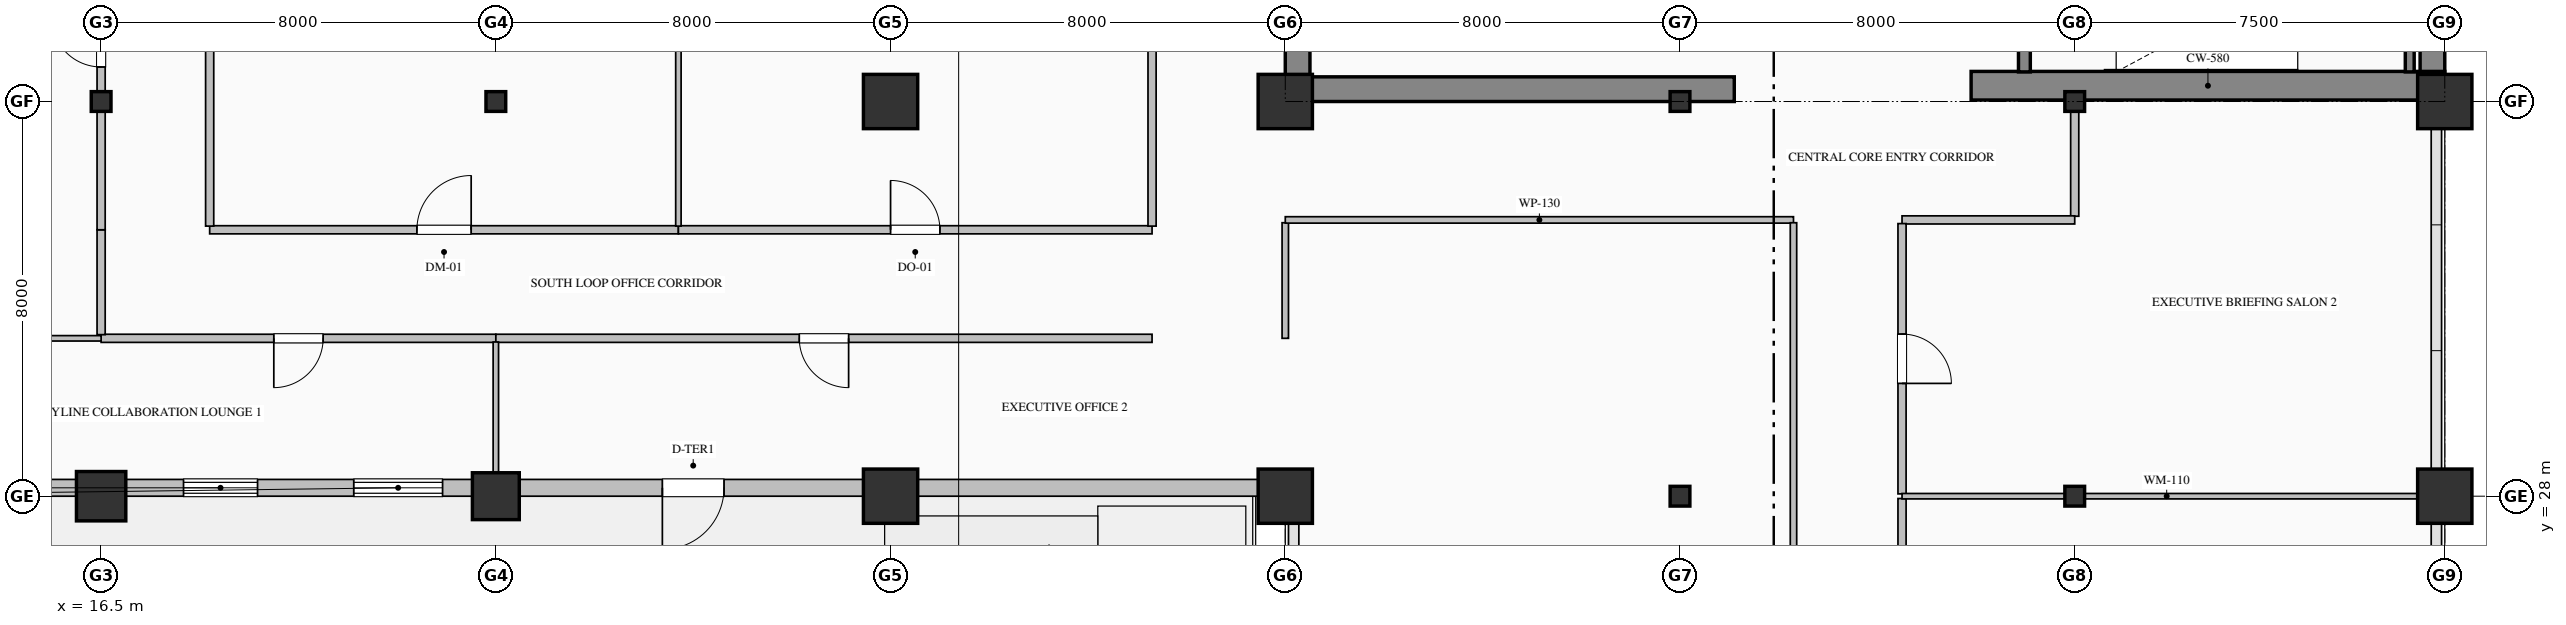
"""IFC4 building model, lengths in metres.
Left out: names, types, materials, properties, quantities, classifications, styles, units other than length and angle.
Written with IfcOpenShell. Run it as: python <this file> out.ifc"""

import sys

from ifc_helpers import new_model, si_unit, direction, frame, frame_2d, origin, origin_2d, place, context, subcontext, project, spatial, rectangle, hollow_rectangle, hollow_circle, i_section, extrude, element, fill, save


model = new_model("IFC4")
c1 = context("Model", 3, precision=1e-05, world=origin(), true_north=direction((0.0, 1.0)))
c2 = subcontext(c1, "Body", "Model", "MODEL_VIEW")
j1 = project(units=[si_unit("LENGTHUNIT", "METRE"), si_unit("PLANEANGLEUNIT", "RADIAN")], contexts=[c1])
p1 = place(None, origin())
s1 = spatial("IfcSite", under=j1, at=p1, CompositionType="ELEMENT")
p2 = place(p1, origin())
s2 = spatial("IfcBuilding", under=s1, at=p2, CompositionType="ELEMENT")
p3 = place(p2, frame((0.0, 0.0, 113.6)))
s3 = spatial("IfcBuildingStorey", under=s2, at=p3, CompositionType="ELEMENT", Elevation=113.6)
p4 = place(p3, frame((63.75, 36.32, 0.0), z_axis=(0.0, 0.0, 1.0), x_axis=(0.0, 1.0, 0.0)))
e1 = element("IfcWall", 1, at=p4, inside=s3, PredefinedType="SHEAR", context=c2, shape_type="SweptSolid", body=[
    extrude(rectangle(XDim=15.18, YDim=0.5, at=frame_2d((7.59, 0.0))), origin(), (0.0, 0.0, 1.0), 5.165),
])
p5 = place(p3, frame((40.75, 36.5, 0.0), z_axis=(0.0, 0.0, 1.0), x_axis=(0.0, 1.0, 0.0)))
e2 = element("IfcWall", 2, at=p5, inside=s3, PredefinedType="SHEAR", context=c2, shape_type="SweptSolid", body=[
    extrude(rectangle(XDim=7.9, YDim=0.5, at=frame_2d((3.95, 0.0))), origin(), (0.0, 0.0, 1.0), 5.165),
])
p6 = place(p3, frame((40.5, 36.25, 0.0), z_axis=(0.0, 0.0, 1.0), x_axis=(1.0, 0.0, 0.0)))
e3 = element("IfcWall", 3, at=p6, inside=s3, PredefinedType="SHEAR", context=c2, shape_type="SweptSolid", body=[
    extrude(rectangle(XDim=9.1, YDim=0.5, at=frame_2d((4.55, 0.0))), origin(), (0.0, 0.0, 1.0), 5.165),
])
p7 = place(p3, frame((54.4, 36.32, 0.0), z_axis=(0.0, 0.0, 1.0), x_axis=(1.0, 0.0, 0.0)))
e4 = element("IfcWall", 4, at=p7, inside=s3, PredefinedType="SHEAR", context=c2, shape_type="SweptSolid", body=[
    extrude(rectangle(XDim=9.6, YDim=0.58, at=frame_2d((4.8, 0.0))), origin(), (0.0, 0.0, 1.0), 5.4),
])
p8 = place(p3, frame((16.5, 28.0, 0.0), z_axis=(0.0, 0.0, 1.0), x_axis=(1.0, 0.0, 0.0)))
e5 = element("IfcColumn", 5, at=p8, inside=s3, PredefinedType="COLUMN", context=c2, shape_type="SweptSolid", body=[
    extrude(hollow_circle(Radius=0.5, WallThickness=0.036, at=origin_2d()), origin(), (0.0, 0.0, 1.0), 5.4),
])
p9 = place(p3, frame((16.5, 36.0, 0.0), z_axis=(0.0, 0.0, 1.0), x_axis=(1.0, 0.0, 0.0)))
e6 = element("IfcColumn", 6, at=p9, inside=s3, PredefinedType="COLUMN", context=c2, shape_type="SweptSolid", body=[
    extrude(i_section(OverallWidth=0.4, OverallDepth=0.4, WebThickness=0.013, FlangeThickness=0.021, FilletRadius=0.022, at=origin_2d()), origin(), (0.0, 0.0, 1.0), 5.4),
])
p10 = place(p3, frame((24.5, 28.0, 0.0), z_axis=(0.0, 0.0, 1.0), x_axis=(1.0, 0.0, 0.0)))
e7 = element("IfcColumn", 7, at=p10, inside=s3, PredefinedType="COLUMN", context=c2, shape_type="SweptSolid", body=[
    extrude(hollow_rectangle(XDim=0.95, YDim=0.95, WallThickness=0.036, at=origin_2d()), origin(), (0.0, 0.0, 1.0), 5.4),
])
p11 = place(p3, frame((24.5, 36.0, 0.0), z_axis=(0.0, 0.0, 1.0), x_axis=(1.0, 0.0, 0.0)))
e8 = element("IfcColumn", 8, at=p11, inside=s3, PredefinedType="COLUMN", context=c2, shape_type="SweptSolid", body=[
    extrude(i_section(OverallWidth=0.4, OverallDepth=0.4, WebThickness=0.013, FlangeThickness=0.021, FilletRadius=0.022, at=origin_2d()), origin(), (0.0, 0.0, 1.0), 5.4),
])
for number, where, z_axis, x_axis in (
    (9, (32.5, 28.0, 0.0), (0.0, 0.0, 1.0), (1.0, 0.0, 0.0)),
    (10, (32.5, 36.0, 0.0), (0.0, 0.0, 1.0), (1.0, 0.0, 0.0)),
    (11, (40.5, 28.0, 0.0), (0.0, 0.0, 1.0), (1.0, 0.0, 0.0)),
    (12, (40.5, 36.0, 0.0), (0.0, 0.0, 1.0), (1.0, 0.0, 0.0)),
):
    element("IfcColumn", number, at=place(p3, frame(where, z_axis=z_axis, x_axis=x_axis)), inside=s3, PredefinedType="COLUMN", context=c2, shape_type="SweptSolid", body=[
        extrude(hollow_rectangle(XDim=1.1, YDim=1.1, WallThickness=0.04, at=origin_2d()), origin(), (0.0, 0.0, 1.0), 5.4),
    ])
for number, where, z_axis, x_axis in (
    (13, (48.5, 28.0, 0.0), (0.0, 0.0, 1.0), (1.0, 0.0, 0.0)),
    (14, (48.5, 36.0, 0.0), (0.0, 0.0, 1.0), (1.0, 0.0, 0.0)),
    (15, (56.5, 28.0, 0.0), (0.0, 0.0, 1.0), (1.0, 0.0, 0.0)),
    (16, (56.5, 36.0, 0.0), (0.0, 0.0, 1.0), (1.0, 0.0, 0.0)),
):
    element("IfcColumn", number, at=place(p3, frame(where, z_axis=z_axis, x_axis=x_axis)), inside=s3, PredefinedType="COLUMN", context=c2, shape_type="SweptSolid", body=[
        extrude(i_section(OverallWidth=0.4, OverallDepth=0.4, WebThickness=0.013, FlangeThickness=0.021, FilletRadius=0.022, at=origin_2d()), origin(), (0.0, 0.0, 1.0), 5.4),
    ])
for number, where, z_axis, x_axis in (
    (17, (64.0, 28.0, 0.0), (0.0, 0.0, 1.0), (1.0, 0.0, 0.0)),
    (18, (64.0, 36.0, 0.0), (0.0, 0.0, 1.0), (1.0, 0.0, 0.0)),
):
    element("IfcColumn", number, at=place(p3, frame(where, z_axis=z_axis, x_axis=x_axis)), inside=s3, PredefinedType="COLUMN", context=c2, shape_type="SweptSolid", body=[
        extrude(hollow_rectangle(XDim=1.1, YDim=1.1, WallThickness=0.04, at=origin_2d()), origin(), (0.0, 0.0, 1.0), 5.4),
    ])
p12 = place(p3, frame((40.52, 28.17, 0.0), z_axis=(0.0, 0.0, 1.0), x_axis=(-1.0, 0.0, 0.0)))
e19 = element("IfcWall", 19, at=p12, inside=s3, PredefinedType="SOLIDWALL", context=c2, shape_type="SweptSolid", body=[
    extrude(rectangle(XDim=27.52, YDim=0.34, at=frame_2d((13.76, 0.0))), origin(), (0.0, 0.0, 1.0), 4.565),
])
p13 = place(p12, frame((17.1, 0.0, 0.65)))
e20 = element("IfcOpeningElement", 20, at=p13, cuts=e19, PredefinedType="OPENING", context=c2, shape_type="SweptSolid", body=[
    extrude(rectangle(XDim=1.8, YDim=2.55, at=frame_2d((0.9, 1.275))), frame((0.0, 0.18, 0.0), z_axis=(0.0, -1.0, 0.0), x_axis=(1.0, 0.0, 0.0)), (0.0, 0.0, 1.0), 0.36),
])
p14 = place(p12, frame((20.85, 0.0, 0.85)))
e21 = element("IfcOpeningElement", 21, at=p14, cuts=e19, PredefinedType="OPENING", context=c2, shape_type="SweptSolid", body=[
    extrude(rectangle(XDim=1.5, YDim=1.95, at=frame_2d((0.75, 0.975))), frame((0.0, 0.18, 0.0), z_axis=(0.0, -1.0, 0.0), x_axis=(1.0, 0.0, 0.0)), (0.0, 0.0, 1.0), 0.36),
])
p15 = place(p12, frame((11.395, 0.0, 0.0)))
e22 = element("IfcOpeningElement", 22, at=p15, cuts=e19, PredefinedType="OPENING", context=c2, shape_type="SweptSolid", body=[
    extrude(rectangle(XDim=1.25, YDim=2.25, at=frame_2d((0.625, 1.125))), frame((0.0, 0.18, 0.0), z_axis=(0.0, -1.0, 0.0), x_axis=(1.0, 0.0, 0.0)), (0.0, 0.0, 1.0), 0.36),
])
p16 = place(p3, frame((55.48, 39.75, 0.0), z_axis=(0.0, 0.0, 1.0), x_axis=(0.0, -1.0, 0.0)))
e23 = element("IfcWall", 23, at=p16, inside=s3, PredefinedType="SOLIDWALL", context=c2, shape_type="SweptSolid", body=[
    extrude(rectangle(XDim=3.15, YDim=0.24, at=frame_2d((1.575, 0.0))), origin(), (0.0, 0.0, 1.0), 5.4),
])
p17 = place(p16, frame((1.0, 0.0, 0.0)))
e24 = element("IfcOpeningElement", 24, at=p17, cuts=e23, PredefinedType="OPENING", context=c2, shape_type="SweptSolid", body=[
    extrude(rectangle(XDim=1.15, YDim=2.2, at=frame_2d((0.575, 1.1))), frame((0.0, 0.13, 0.0), z_axis=(0.0, -1.0, 0.0), x_axis=(1.0, 0.0, 0.0)), (0.0, 0.0, 1.0), 0.26),
])
p18 = place(p3, frame((63.29, 36.6, 0.0), z_axis=(0.0, 0.0, 1.0), x_axis=(0.0, 1.0, 0.0)))
e25 = element("IfcWall", 25, at=p18, inside=s3, PredefinedType="SOLIDWALL", context=c2, shape_type="SweptSolid", body=[
    extrude(rectangle(XDim=3.15, YDim=0.18, at=frame_2d((1.575, 0.0))), origin(), (0.0, 0.0, 1.0), 5.4),
])
p19 = place(p3, frame((18.7, 33.4, 0.0), z_axis=(0.0, 0.0, 1.0), x_axis=(1.0, 0.0, 0.0)))
e26 = element("IfcWall", 26, at=p19, inside=s3, PredefinedType="PARTITIONING", context=c2, shape_type="SweptSolid", body=[
    extrude(rectangle(XDim=9.5, YDim=0.165, at=frame_2d((4.75, 0.0))), origin(), (0.0, 0.0, 1.0), 5.165),
])
p20 = place(p19, frame((4.2, 0.0, 0.0)))
e27 = element("IfcOpeningElement", 27, at=p20, cuts=e26, PredefinedType="OPENING", context=c2, shape_type="SweptSolid", body=[
    extrude(rectangle(XDim=1.1, YDim=2.2, at=frame_2d((0.55, 1.1))), frame((0.0, 0.093, 0.0), z_axis=(0.0, -1.0, 0.0), x_axis=(1.0, 0.0, 0.0)), (0.0, 0.0, 1.0), 0.185),
])
p21 = place(p3, frame((28.2, 33.4, 0.0), z_axis=(0.0, 0.0, 1.0), x_axis=(1.0, 0.0, 0.0)))
e28 = element("IfcWall", 28, at=p21, inside=s3, PredefinedType="PARTITIONING", context=c2, shape_type="SweptSolid", body=[
    extrude(rectangle(XDim=9.6, YDim=0.165, at=frame_2d((4.8, 0.0))), origin(), (0.0, 0.0, 1.0), 5.165),
])
p22 = place(p21, frame((4.3, 0.0, 0.0)))
e29 = element("IfcOpeningElement", 29, at=p22, cuts=e28, PredefinedType="OPENING", context=c2, shape_type="SweptSolid", body=[
    extrude(rectangle(XDim=1.0, YDim=2.15, at=frame_2d((0.5, 1.075))), frame((0.0, 0.093, 0.0), z_axis=(0.0, -1.0, 0.0), x_axis=(1.0, 0.0, 0.0)), (0.0, 0.0, 1.0), 0.185),
])
p23 = place(p3, frame((24.5, 31.2, 0.0), z_axis=(0.0, 0.0, 1.0), x_axis=(-1.0, 0.0, 0.0)))
e30 = element("IfcWall", 30, at=p23, inside=s3, PredefinedType="PARTITIONING", context=c2, shape_type="SweptSolid", body=[
    extrude(rectangle(XDim=8.0, YDim=0.165, at=frame_2d((4.0, 0.0))), origin(), (0.0, 0.0, 1.0), 5.165),
])
p24 = place(p23, frame((3.5, 0.0, 0.0)))
e31 = element("IfcOpeningElement", 31, at=p24, cuts=e30, PredefinedType="OPENING", context=c2, shape_type="SweptSolid", body=[
    extrude(rectangle(XDim=1.0, YDim=2.15, at=frame_2d((0.5, 1.075))), frame((0.0, 0.093, 0.0), z_axis=(0.0, -1.0, 0.0), x_axis=(1.0, 0.0, 0.0)), (0.0, 0.0, 1.0), 0.185),
])
p25 = place(p3, frame((37.8, 31.2, 0.0), z_axis=(0.0, 0.0, 1.0), x_axis=(-1.0, 0.0, 0.0)))
e32 = element("IfcWall", 32, at=p25, inside=s3, PredefinedType="PARTITIONING", context=c2, shape_type="SweptSolid", body=[
    extrude(rectangle(XDim=13.3, YDim=0.165, at=frame_2d((6.65, 0.0))), origin(), (0.0, 0.0, 1.0), 5.165),
])
p26 = place(p25, frame((6.15, 0.0, 0.0)))
e33 = element("IfcOpeningElement", 33, at=p26, cuts=e32, PredefinedType="OPENING", context=c2, shape_type="SweptSolid", body=[
    extrude(rectangle(XDim=1.0, YDim=2.15, at=frame_2d((0.5, 1.075))), frame((0.0, 0.093, 0.0), z_axis=(0.0, -1.0, 0.0), x_axis=(1.0, 0.0, 0.0)), (0.0, 0.0, 1.0), 0.185),
])
p27 = place(p3, frame((16.5, 31.274, 0.0), z_axis=(0.0, 0.0, 1.0), x_axis=(0.0, 1.0, 0.0)))
e34 = element("IfcWall", 34, at=p27, inside=s3, PredefinedType="PARTITIONING", context=c2, shape_type="SweptSolid", body=[
    extrude(rectangle(XDim=2.125, YDim=0.165, at=frame_2d((1.063, 0.0))), origin(), (0.0, 0.0, 1.0), 4.557),
])
p28 = place(p3, frame((18.7, 40.926, 0.0), z_axis=(0.0, 0.0, 1.0), x_axis=(0.0, -1.0, 0.0)))
e35 = element("IfcWall", 35, at=p28, inside=s3, PredefinedType="PARTITIONING", context=c2, shape_type="SweptSolid", body=[
    extrude(rectangle(XDim=7.451, YDim=0.165, at=frame_2d((3.726, 0.0))), origin(), (0.0, 0.0, 1.0), 5.165),
])
p29 = place(p3, frame((16.5, 33.4, 0.0), z_axis=(0.0, 0.0, 1.0), x_axis=(0.0, 1.0, 0.0)))
e36 = element("IfcWall", 36, at=p29, inside=s3, PredefinedType="PARTITIONING", context=c2, shape_type="SweptSolid", body=[
    extrude(rectangle(XDim=7.6, YDim=0.165, at=frame_2d((3.8, 0.0))), origin(), (0.0, 0.0, 1.0), 4.557),
])
p30 = place(p29, frame((3.3, 0.0, 0.0)))
e37 = element("IfcOpeningElement", 37, at=p30, cuts=e36, PredefinedType="OPENING", context=c2, shape_type="SweptSolid", body=[
    extrude(rectangle(XDim=1.0, YDim=2.15, at=frame_2d((0.5, 1.075))), frame((0.0, 0.093, 0.0), z_axis=(0.0, -1.0, 0.0), x_axis=(1.0, 0.0, 0.0)), (0.0, 0.0, 1.0), 0.185),
])
p31 = place(p3, frame((37.8, 33.475, 0.0), z_axis=(0.0, 0.0, 1.0), x_axis=(0.0, 1.0, 0.0)))
e38 = element("IfcWall", 38, at=p31, inside=s3, PredefinedType="PARTITIONING", context=c2, shape_type="SweptSolid", body=[
    extrude(rectangle(XDim=7.451, YDim=0.165, at=frame_2d((3.726, 0.0))), origin(), (0.0, 0.0, 1.0), 5.165),
])
p32 = place(p3, frame((40.5, 33.543, 0.0), z_axis=(0.0, 0.0, 1.0), x_axis=(0.0, -1.0, 0.0)))
e39 = element("IfcWall", 39, at=p32, inside=s3, PredefinedType="PARTITIONING", context=c2, shape_type="SweptSolid", body=[
    extrude(rectangle(XDim=2.343, YDim=0.13, at=frame_2d((1.171, 0.0))), origin(), (0.0, 0.0, 1.0), 4.557),
])
p33 = place(p3, frame((56.5, 36.0, 0.0), z_axis=(0.0, 0.0, 1.0), x_axis=(0.0, -1.0, 0.0)))
e40 = element("IfcWall", 40, at=p33, inside=s3, PredefinedType="PARTITIONING", context=c2, shape_type="SweptSolid", body=[
    extrude(rectangle(XDim=2.325, YDim=0.165, at=frame_2d((1.163, 0.0))), origin(), (0.0, 0.0, 1.0), 4.557),
])
p34 = place(p3, frame((56.5, 33.6, 0.0), z_axis=(0.0, 0.0, 1.0), x_axis=(-1.0, 0.0, 0.0)))
e41 = element("IfcWall", 41, at=p34, inside=s3, PredefinedType="PARTITIONING", context=c2, shape_type="SweptSolid", body=[
    extrude(rectangle(XDim=3.5, YDim=0.165, at=frame_2d((1.75, 0.0))), origin(), (0.0, 0.0, 1.0), 5.165),
])
p35 = place(p3, frame((50.8, 33.6, 0.0), z_axis=(0.0, 0.0, 1.0), x_axis=(-1.0, 0.0, 0.0)))
e42 = element("IfcWall", 42, at=p35, inside=s3, PredefinedType="PARTITIONING", context=c2, shape_type="SweptSolid", body=[
    extrude(rectangle(XDim=10.3, YDim=0.13, at=frame_2d((5.15, 0.0))), origin(), (0.0, 0.0, 1.0), 5.165),
])
p36 = place(p3, frame((53.0, 27.953, 0.0), z_axis=(0.0, 0.0, 1.0), x_axis=(0.0, -1.0, 0.0)))
e43 = element("IfcWall", 43, at=p36, inside=s3, PredefinedType="PARTITIONING", context=c2, shape_type="SweptSolid", body=[
    extrude(rectangle(XDim=13.178, YDim=0.165, at=frame_2d((6.589, 0.0))), origin(), (0.0, 0.0, 1.0), 5.165),
])
p37 = place(p36, frame((6.089, 0.0, 0.0)))
e44 = element("IfcOpeningElement", 44, at=p37, cuts=e43, PredefinedType="OPENING", context=c2, shape_type="SweptSolid", body=[
    extrude(rectangle(XDim=1.0, YDim=2.15, at=frame_2d((0.5, 1.075))), frame((0.0, 0.093, 0.0), z_axis=(0.0, -1.0, 0.0), x_axis=(1.0, 0.0, 0.0)), (0.0, 0.0, 1.0), 0.185),
])
p38 = place(p3, frame((53.0, 33.525, 0.0), z_axis=(0.0, 0.0, 1.0), x_axis=(0.0, -1.0, 0.0)))
e45 = element("IfcWall", 45, at=p38, inside=s3, PredefinedType="PARTITIONING", context=c2, shape_type="SweptSolid", body=[
    extrude(rectangle(XDim=5.478, YDim=0.165, at=frame_2d((2.739, 0.0))), origin(), (0.0, 0.0, 1.0), 5.165),
])
p39 = place(p38, frame((2.239, 0.0, 0.0)))
e46 = element("IfcOpeningElement", 46, at=p39, cuts=e45, PredefinedType="OPENING", context=c2, shape_type="SweptSolid", body=[
    extrude(rectangle(XDim=1.0, YDim=2.15, at=frame_2d((0.5, 1.075))), frame((0.0, 0.093, 0.0), z_axis=(0.0, -1.0, 0.0), x_axis=(1.0, 0.0, 0.0)), (0.0, 0.0, 1.0), 0.185),
])
p40 = place(p3, frame((50.8, 14.7, 0.0), z_axis=(0.0, 0.0, 1.0), x_axis=(0.0, 1.0, 0.0)))
e47 = element("IfcWall", 47, at=p40, inside=s3, PredefinedType="PARTITIONING", context=c2, shape_type="SweptSolid", body=[
    extrude(rectangle(XDim=18.843, YDim=0.13, at=frame_2d((9.421, 0.0))), origin(), (0.0, 0.0, 1.0), 5.165),
])
p41 = place(p40, frame((8.921, 0.0, 0.0)))
e48 = element("IfcOpeningElement", 48, at=p41, cuts=e47, PredefinedType="OPENING", context=c2, shape_type="SweptSolid", body=[
    extrude(rectangle(XDim=1.0, YDim=2.15, at=frame_2d((0.5, 1.075))), frame((0.0, 0.075, 0.0), z_axis=(0.0, -1.0, 0.0), x_axis=(1.0, 0.0, 0.0)), (0.0, 0.0, 1.0), 0.15),
])
p42 = place(p3, frame((28.2, 40.926, 0.0), z_axis=(0.0, 0.0, 1.0), x_axis=(0.0, -1.0, 0.0)))
e49 = element("IfcWall", 49, at=p42, inside=s3, PredefinedType="MOVABLE", context=c2, shape_type="SweptSolid", body=[
    extrude(rectangle(XDim=7.451, YDim=0.11, at=frame_2d((3.726, 0.0))), origin(), (0.0, 0.0, 1.0), 5.165),
])
p43 = place(p3, frame((24.5, 31.125, 0.0), z_axis=(0.0, 0.0, 1.0), x_axis=(0.0, -1.0, 0.0)))
e50 = element("IfcWall", 50, at=p43, inside=s3, PredefinedType="MOVABLE", context=c2, shape_type="SweptSolid", body=[
    extrude(rectangle(XDim=2.793, YDim=0.11, at=frame_2d((1.397, 0.0))), origin(), (0.0, 0.0, 1.0), 4.557),
])
p44 = place(p3, frame((10.27, 31.2, 0.0), z_axis=(0.0, 0.0, 1.0), x_axis=(1.0, 0.0, 0.0)))
e51 = element("IfcWall", 51, at=p44, inside=s3, PredefinedType="MOVABLE", context=c2, shape_type="SweptSolid", body=[
    extrude(rectangle(XDim=6.23, YDim=0.11, at=frame_2d((3.115, 0.0))), origin(), (0.0, 0.0, 1.0), 5.165),
])
p45 = place(p3, frame((53.0, 28.0, 0.0), z_axis=(0.0, 0.0, 1.0), x_axis=(1.0, 0.0, 0.0)))
e52 = element("IfcWall", 52, at=p45, inside=s3, PredefinedType="MOVABLE", context=c2, shape_type="SweptSolid", body=[
    extrude(rectangle(XDim=10.728, YDim=0.11, at=frame_2d((5.364, 0.0))), origin(), (0.0, 0.0, 1.0), 4.557),
])
p46 = place(p13, origin())
e53 = element("IfcWindow", 53, at=p46, inside=s3, PartitioningType="TRIPLE_PANEL_VERTICAL", PredefinedType="WINDOW", context=c2, shape_type="SweptSolid", body=[
    extrude(rectangle(XDim=1.8, YDim=2.55, at=frame_2d((0.9, 1.275))), frame((0.0, 0.15, 0.0), z_axis=(0.0, -1.0, 0.0), x_axis=(1.0, 0.0, 0.0)), (0.0, 0.0, 1.0), 0.06),
])
fill(e20, e53)
p47 = place(p14, origin())
e54 = element("IfcWindow", 54, at=p47, inside=s3, PartitioningType="DOUBLE_PANEL_VERTICAL", PredefinedType="WINDOW", context=c2, shape_type="SweptSolid", body=[
    extrude(rectangle(XDim=1.5, YDim=1.95, at=frame_2d((0.75, 0.975))), frame((0.0, 0.15, 0.0), z_axis=(0.0, -1.0, 0.0), x_axis=(1.0, 0.0, 0.0)), (0.0, 0.0, 1.0), 0.06),
])
fill(e21, e54)
p48 = place(p15, origin())
e55 = element("IfcDoor", 55, at=p48, inside=s3, OperationType="SINGLE_SWING_RIGHT", PredefinedType="DOOR", context=c2, shape_type="SweptSolid", body=[
    extrude(rectangle(XDim=1.25, YDim=2.25, at=frame_2d((0.625, 1.125))), frame((0.0, 0.025, 0.0), z_axis=(0.0, -1.0, 0.0), x_axis=(1.0, 0.0, 0.0)), (0.0, 0.0, 1.0), 0.05),
])
fill(e22, e55)
p49 = place(p20, origin())
e56 = element("IfcDoor", 56, at=p49, inside=s3, OperationType="SINGLE_SWING_RIGHT", PredefinedType="DOOR", context=c2, shape_type="SweptSolid", body=[
    extrude(rectangle(XDim=1.1, YDim=2.2, at=frame_2d((0.55, 1.1))), frame((0.0, 0.025, 0.0), z_axis=(0.0, -1.0, 0.0), x_axis=(1.0, 0.0, 0.0)), (0.0, 0.0, 1.0), 0.05),
])
fill(e27, e56)
p50 = place(p22, origin())
e57 = element("IfcDoor", 57, at=p50, inside=s3, OperationType="SINGLE_SWING_LEFT", PredefinedType="DOOR", context=c2, shape_type="SweptSolid", body=[
    extrude(rectangle(XDim=1.0, YDim=2.15, at=frame_2d((0.5, 1.075))), frame((0.0, 0.025, 0.0), z_axis=(0.0, -1.0, 0.0), x_axis=(1.0, 0.0, 0.0)), (0.0, 0.0, 1.0), 0.05),
])
fill(e29, e57)
p51 = place(p24, origin())
e58 = element("IfcDoor", 58, at=p51, inside=s3, OperationType="SINGLE_SWING_RIGHT", PredefinedType="DOOR", context=c2, shape_type="SweptSolid", body=[
    extrude(rectangle(XDim=1.0, YDim=2.15, at=frame_2d((0.5, 1.075))), frame((0.0, 0.025, 0.0), z_axis=(0.0, -1.0, 0.0), x_axis=(1.0, 0.0, 0.0)), (0.0, 0.0, 1.0), 0.05),
])
fill(e31, e58)
p52 = place(p26, origin())
e59 = element("IfcDoor", 59, at=p52, inside=s3, OperationType="SINGLE_SWING_LEFT", PredefinedType="DOOR", context=c2, shape_type="SweptSolid", body=[
    extrude(rectangle(XDim=1.0, YDim=2.15, at=frame_2d((0.5, 1.075))), frame((0.0, 0.025, 0.0), z_axis=(0.0, -1.0, 0.0), x_axis=(1.0, 0.0, 0.0)), (0.0, 0.0, 1.0), 0.05),
])
fill(e33, e59)
p53 = place(p30, origin())
e60 = element("IfcDoor", 60, at=p53, inside=s3, OperationType="SINGLE_SWING_RIGHT", PredefinedType="DOOR", context=c2, shape_type="SweptSolid", body=[
    extrude(rectangle(XDim=1.0, YDim=2.15, at=frame_2d((0.5, 1.075))), frame((0.0, 0.025, 0.0), z_axis=(0.0, -1.0, 0.0), x_axis=(1.0, 0.0, 0.0)), (0.0, 0.0, 1.0), 0.05),
])
fill(e37, e60)
p54 = place(p39, origin())
e61 = element("IfcDoor", 61, at=p54, inside=s3, OperationType="SINGLE_SWING_RIGHT", PredefinedType="DOOR", context=c2, shape_type="SweptSolid", body=[
    extrude(rectangle(XDim=1.0, YDim=2.15, at=frame_2d((0.5, 1.075))), frame((0.0, 0.025, 0.0), z_axis=(0.0, -1.0, 0.0), x_axis=(1.0, 0.0, 0.0)), (0.0, 0.0, 1.0), 0.05),
])
fill(e46, e61)
save(model, sys.argv[1])
